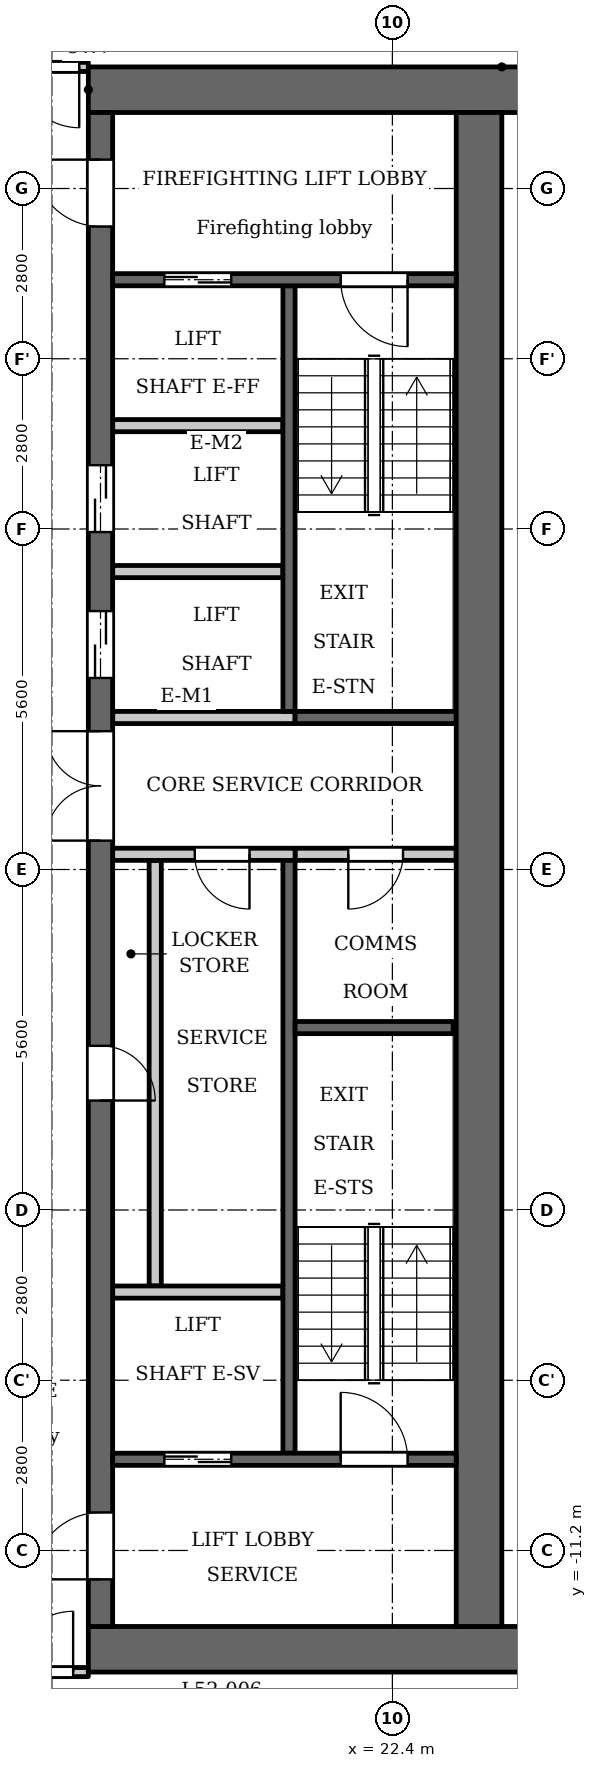
"""IFC4 building model, lengths in metres.
Left out: names, types, materials, properties, quantities, classifications, styles, units other than length and angle.
Written with IfcOpenShell. Run it as: python <this file> out.ifc"""

import sys

from ifc_helpers import new_model, si_unit, direction, frame, frame_2d, origin, place, context, subcontext, project, spatial, rectangle, extrude, element, fill, save


model = new_model("IFC4")
c1 = context("Model", 3, precision=1e-05, world=origin(), true_north=direction((0.0, 1.0)))
c2 = subcontext(c1, "Body", "Model", "MODEL_VIEW")
j1 = project(units=[si_unit("LENGTHUNIT", "METRE"), si_unit("PLANEANGLEUNIT", "RADIAN")], contexts=[c1])
p1 = place(None, origin())
s1 = spatial("IfcSite", under=j1, at=p1, CompositionType="ELEMENT")
p2 = place(p1, origin())
s2 = spatial("IfcBuilding", under=s1, at=p2, CompositionType="ELEMENT")
p3 = place(p2, frame((0.0, 0.0, 202.9)))
s3 = spatial("IfcBuildingStorey", under=s2, at=p3, CompositionType="ELEMENT", Elevation=202.9)
p4 = place(p3, frame((20.7, 2.6, 0.0), z_axis=(0.0, 0.0, 1.0), x_axis=(0.0, 1.0, 0.0)))
e1 = element("IfcWall", 1, at=p4, inside=s3, PredefinedType="SHEAR", context=c2, shape_type="SweptSolid", body=[
    extrude(rectangle(XDim=7.0, YDim=0.2, at=frame_2d((3.5, 0.0))), origin(), (0.0, 0.0, 1.0), 3.2),
])
p5 = place(p3, frame((20.7, -9.6, 0.0), z_axis=(0.0, 0.0, 1.0), x_axis=(0.0, 1.0, 0.0)))
e2 = element("IfcWall", 2, at=p5, inside=s3, PredefinedType="SHEAR", context=c2, shape_type="SweptSolid", body=[
    extrude(rectangle(XDim=9.75, YDim=0.2, at=frame_2d((4.875, 0.0))), origin(), (0.0, 0.0, 1.0), 3.2),
])
p6 = place(p3, frame((20.8, 2.5, 0.0), z_axis=(0.0, 0.0, 1.0), x_axis=(1.0, 0.0, 0.0)))
e3 = element("IfcWall", 3, at=p6, inside=s3, PredefinedType="SHEAR", context=c2, shape_type="SweptSolid", body=[
    extrude(rectangle(XDim=2.65, YDim=0.2, at=frame_2d((1.325, 0.0))), origin(), (0.0, 0.0, 1.0), 3.2),
])
p7 = place(p3, frame((20.8, 0.25, 0.0), z_axis=(0.0, 0.0, 1.0), x_axis=(1.0, 0.0, 0.0)))
e4 = element("IfcWall", 4, at=p7, inside=s3, PredefinedType="PARTITIONING", context=c2, shape_type="SweptSolid", body=[
    extrude(rectangle(XDim=2.65, YDim=0.2, at=frame_2d((1.325, 0.0))), origin(), (0.0, 0.0, 1.0), 3.2),
])
p8 = place(p7, frame((0.875, 0.0, 0.0)))
e5 = element("IfcOpeningElement", 5, at=p8, cuts=e4, PredefinedType="OPENING", context=c2, shape_type="SweptSolid", body=[
    extrude(rectangle(XDim=0.9, YDim=2.1, at=frame_2d((0.45, 1.05))), frame((0.0, 0.11, 0.0), z_axis=(0.0, -1.0, 0.0), x_axis=(1.0, 0.0, 0.0)), (0.0, 0.0, 1.0), 0.22),
])
for number, where, z_axis, x_axis in (
    (6, (17.4, 12.825, 0.0), (0.0, 0.0, 1.0), (1.0, 0.0, 0.0)),
    (7, (17.4, -12.825, 0.0), (0.0, 0.0, 1.0), (1.0, 0.0, 0.0)),
):
    element("IfcWall", number, at=place(p3, frame(where, z_axis=z_axis, x_axis=x_axis)), inside=s3, PredefinedType="SHEAR", context=c2, shape_type="SweptSolid", body=[
        extrude(rectangle(XDim=7.6, YDim=0.75, at=frame_2d((3.8, 0.0))), origin(), (0.0, 0.0, 1.0), 3.2),
    ])
p9 = place(p3, frame((18.5, -6.85, 0.0), z_axis=(0.0, 0.0, 1.0), x_axis=(0.0, 1.0, 0.0)))
e8 = element("IfcWall", 8, at=p9, inside=s3, PredefinedType="PARTITIONING", context=c2, shape_type="SweptSolid", body=[
    extrude(rectangle(XDim=7.0, YDim=0.2, at=frame_2d((3.5, 0.0))), origin(), (0.0, 0.0, 1.0), 3.2),
])
p10 = place(p3, frame((17.6, -12.45, 0.0), z_axis=(0.0, 0.0, 1.0), x_axis=(0.0, 1.0, 0.0)))
e9 = element("IfcWall", 9, at=p10, inside=s3, PredefinedType="SHEAR", context=c2, shape_type="SweptSolid", body=[
    extrude(rectangle(XDim=24.9, YDim=0.4, at=frame_2d((12.45, 0.0))), origin(), (0.0, 0.0, 1.0), 3.2),
])
p11 = place(p10, frame((8.65, 0.0, 0.0)))
e10 = element("IfcOpeningElement", 10, at=p11, cuts=e9, PredefinedType="OPENING", context=c2, shape_type="SweptSolid", body=[
    extrude(rectangle(XDim=0.9, YDim=2.1, at=frame_2d((0.45, 1.05))), frame((0.0, 0.21, 0.0), z_axis=(0.0, -1.0, 0.0), x_axis=(1.0, 0.0, 0.0)), (0.0, 0.0, 1.0), 0.42),
])
p12 = place(p10, frame((15.6, 0.0, 0.0)))
e11 = element("IfcOpeningElement", 11, at=p12, cuts=e9, PredefinedType="OPENING", context=c2, shape_type="SweptSolid", body=[
    extrude(rectangle(XDim=1.1, YDim=2.1, at=frame_2d((0.55, 1.05))), frame((0.0, 0.21, 0.0), z_axis=(0.0, -1.0, 0.0), x_axis=(1.0, 0.0, 0.0)), (0.0, 0.0, 1.0), 0.42),
])
p13 = place(p10, frame((18.0, 0.0, 0.0)))
e12 = element("IfcOpeningElement", 12, at=p13, cuts=e9, PredefinedType="OPENING", context=c2, shape_type="SweptSolid", body=[
    extrude(rectangle(XDim=1.1, YDim=2.1, at=frame_2d((0.55, 1.05))), frame((0.0, 0.21, 0.0), z_axis=(0.0, -1.0, 0.0), x_axis=(1.0, 0.0, 0.0)), (0.0, 0.0, 1.0), 0.42),
])
p14 = place(p10, frame((23.025, 0.0, 0.0)))
e13 = element("IfcOpeningElement", 13, at=p14, cuts=e9, PredefinedType="OPENING", context=c2, shape_type="SweptSolid", body=[
    extrude(rectangle(XDim=1.1, YDim=2.1, at=frame_2d((0.55, 1.05))), frame((0.0, 0.21, 0.0), z_axis=(0.0, -1.0, 0.0), x_axis=(1.0, 0.0, 0.0)), (0.0, 0.0, 1.0), 0.42),
])
p15 = place(p10, frame((0.775, 0.0, 0.0)))
e14 = element("IfcOpeningElement", 14, at=p15, cuts=e9, PredefinedType="OPENING", context=c2, shape_type="SweptSolid", body=[
    extrude(rectangle(XDim=1.1, YDim=2.1, at=frame_2d((0.55, 1.05))), frame((0.0, 0.21, 0.0), z_axis=(0.0, -1.0, 0.0), x_axis=(1.0, 0.0, 0.0)), (0.0, 0.0, 1.0), 0.42),
])
p16 = place(p10, frame((12.925, 0.0, 0.0)))
e15 = element("IfcOpeningElement", 15, at=p16, cuts=e9, PredefinedType="OPENING", context=c2, shape_type="SweptSolid", body=[
    extrude(rectangle(XDim=1.8, YDim=2.1, at=frame_2d((0.9, 1.05))), frame((0.0, 0.21, 0.0), z_axis=(0.0, -1.0, 0.0), x_axis=(1.0, 0.0, 0.0)), (0.0, 0.0, 1.0), 0.42),
])
p17 = place(p3, frame((23.825, -12.45, 0.0), z_axis=(0.0, 0.0, 1.0), x_axis=(0.0, 1.0, 0.0)))
e16 = element("IfcWall", 16, at=p17, inside=s3, PredefinedType="SHEAR", context=c2, shape_type="SweptSolid", body=[
    extrude(rectangle(XDim=24.9, YDim=0.75, at=frame_2d((12.45, 0.0))), origin(), (0.0, 0.0, 1.0), 3.2),
])
p18 = place(p3, frame((17.8, -9.7, 0.0), z_axis=(0.0, 0.0, 1.0), x_axis=(1.0, 0.0, 0.0)))
e17 = element("IfcWall", 17, at=p18, inside=s3, PredefinedType="SHEAR", context=c2, shape_type="SweptSolid", body=[
    extrude(rectangle(XDim=5.65, YDim=0.2, at=frame_2d((2.825, 0.0))), origin(), (0.0, 0.0, 1.0), 3.2),
])
p19 = place(p18, frame((0.85, 0.0, 0.0)))
e18 = element("IfcOpeningElement", 18, at=p19, cuts=e17, PredefinedType="OPENING", context=c2, shape_type="SweptSolid", body=[
    extrude(rectangle(XDim=1.1, YDim=2.1, at=frame_2d((0.55, 1.05))), frame((0.0, 0.11, 0.0), z_axis=(0.0, -1.0, 0.0), x_axis=(1.0, 0.0, 0.0)), (0.0, 0.0, 1.0), 0.22),
])
p20 = place(p18, frame((3.75, 0.0, 0.0)))
e19 = element("IfcOpeningElement", 19, at=p20, cuts=e17, PredefinedType="OPENING", context=c2, shape_type="SweptSolid", body=[
    extrude(rectangle(XDim=1.1, YDim=2.1, at=frame_2d((0.55, 1.05))), frame((0.0, 0.11, 0.0), z_axis=(0.0, -1.0, 0.0), x_axis=(1.0, 0.0, 0.0)), (0.0, 0.0, 1.0), 0.22),
])
p21 = place(p3, frame((17.8, -6.95, 0.0), z_axis=(0.0, 0.0, 1.0), x_axis=(1.0, 0.0, 0.0)))
e20 = element("IfcWall", 20, at=p21, inside=s3, PredefinedType="PARTITIONING", context=c2, shape_type="SweptSolid", body=[
    extrude(rectangle(XDim=2.8, YDim=0.2, at=frame_2d((1.4, 0.0))), origin(), (0.0, 0.0, 1.0), 3.2),
])
p22 = place(p3, frame((17.8, 0.25, 0.0), z_axis=(0.0, 0.0, 1.0), x_axis=(1.0, 0.0, 0.0)))
e21 = element("IfcWall", 21, at=p22, inside=s3, PredefinedType="PARTITIONING", context=c2, shape_type="SweptSolid", body=[
    extrude(rectangle(XDim=3.0, YDim=0.2, at=frame_2d((1.5, 0.0))), origin(), (0.0, 0.0, 1.0), 3.2),
])
p23 = place(p22, frame((1.35, 0.0, 0.0)))
e22 = element("IfcOpeningElement", 22, at=p23, cuts=e21, PredefinedType="OPENING", context=c2, shape_type="SweptSolid", body=[
    extrude(rectangle(XDim=0.9, YDim=2.1, at=frame_2d((0.45, 1.05))), frame((0.0, 0.11, 0.0), z_axis=(0.0, -1.0, 0.0), x_axis=(1.0, 0.0, 0.0)), (0.0, 0.0, 1.0), 0.22),
])
p24 = place(p3, frame((17.8, 2.5, 0.0), z_axis=(0.0, 0.0, 1.0), x_axis=(1.0, 0.0, 0.0)))
e23 = element("IfcWall", 23, at=p24, inside=s3, PredefinedType="PARTITIONING", context=c2, shape_type="SweptSolid", body=[
    extrude(rectangle(XDim=3.0, YDim=0.2, at=frame_2d((1.5, 0.0))), origin(), (0.0, 0.0, 1.0), 3.2),
])
for number, where, z_axis, x_axis in (
    (24, (17.8, 4.9, 0.0), (0.0, 0.0, 1.0), (1.0, 0.0, 0.0)),
    (25, (17.8, 7.3, 0.0), (0.0, 0.0, 1.0), (1.0, 0.0, 0.0)),
):
    element("IfcWall", number, at=place(p3, frame(where, z_axis=z_axis, x_axis=x_axis)), inside=s3, PredefinedType="PARTITIONING", context=c2, shape_type="SweptSolid", body=[
        extrude(rectangle(XDim=2.8, YDim=0.2, at=frame_2d((1.4, 0.0))), origin(), (0.0, 0.0, 1.0), 3.2),
    ])
p25 = place(p3, frame((17.8, 9.7, 0.0), z_axis=(0.0, 0.0, 1.0), x_axis=(1.0, 0.0, 0.0)))
e26 = element("IfcWall", 26, at=p25, inside=s3, PredefinedType="SHEAR", context=c2, shape_type="SweptSolid", body=[
    extrude(rectangle(XDim=5.65, YDim=0.2, at=frame_2d((2.825, 0.0))), origin(), (0.0, 0.0, 1.0), 3.2),
])
p26 = place(p25, frame((0.85, 0.0, 0.0)))
e27 = element("IfcOpeningElement", 27, at=p26, cuts=e26, PredefinedType="OPENING", context=c2, shape_type="SweptSolid", body=[
    extrude(rectangle(XDim=1.1, YDim=2.1, at=frame_2d((0.55, 1.05))), frame((0.0, 0.11, 0.0), z_axis=(0.0, -1.0, 0.0), x_axis=(1.0, 0.0, 0.0)), (0.0, 0.0, 1.0), 0.22),
])
p27 = place(p25, frame((3.75, 0.0, 0.0)))
e28 = element("IfcOpeningElement", 28, at=p27, cuts=e26, PredefinedType="OPENING", context=c2, shape_type="SweptSolid", body=[
    extrude(rectangle(XDim=1.1, YDim=2.1, at=frame_2d((0.55, 1.05))), frame((0.0, 0.11, 0.0), z_axis=(0.0, -1.0, 0.0), x_axis=(1.0, 0.0, 0.0)), (0.0, 0.0, 1.0), 0.22),
])
p28 = place(p3, frame((20.8, -2.6, 0.0), z_axis=(0.0, 0.0, 1.0), x_axis=(1.0, 0.0, 0.0)))
e29 = element("IfcWall", 29, at=p28, inside=s3, PredefinedType="SHEAR", context=c2, shape_type="SweptSolid", body=[
    extrude(rectangle(XDim=2.6, YDim=0.2, at=frame_2d((1.3, 0.0))), origin(), (0.0, 0.0, 1.0), 3.2),
])
p29 = place(p3, frame((-17.4, -13.2, 0.0), z_axis=(0.0, 0.0, 1.0), x_axis=(1.0, 0.0, 0.0)))
e30 = element("IfcWall", 30, at=p29, inside=s3, PredefinedType="PARTITIONING", context=c2, shape_type="SweptSolid", body=[
    extrude(rectangle(XDim=34.8, YDim=0.15, at=frame_2d((17.4, 0.0))), origin(), (0.0, 0.0, 1.0), 3.2),
])
p30 = place(p29, frame((0.15, 0.0, 0.0)))
e31 = element("IfcOpeningElement", 31, at=p30, cuts=e30, PredefinedType="OPENING", context=c2, shape_type="SweptSolid", body=[
    extrude(rectangle(XDim=1.0, YDim=2.1, at=frame_2d((0.5, 1.05))), frame((0.0, 0.085, 0.0), z_axis=(0.0, -1.0, 0.0), x_axis=(1.0, 0.0, 0.0)), (0.0, 0.0, 1.0), 0.17),
])
p31 = place(p29, frame((33.55, 0.0, 0.0)))
e32 = element("IfcOpeningElement", 32, at=p31, cuts=e30, PredefinedType="OPENING", context=c2, shape_type="SweptSolid", body=[
    extrude(rectangle(XDim=1.0, YDim=2.1, at=frame_2d((0.5, 1.05))), frame((0.0, 0.085, 0.0), z_axis=(0.0, -1.0, 0.0), x_axis=(1.0, 0.0, 0.0)), (0.0, 0.0, 1.0), 0.17),
])
p32 = place(p3, frame((-17.4, 13.2, 0.0), z_axis=(0.0, 0.0, 1.0), x_axis=(1.0, 0.0, 0.0)))
e33 = element("IfcWall", 33, at=p32, inside=s3, PredefinedType="PARTITIONING", context=c2, shape_type="SweptSolid", body=[
    extrude(rectangle(XDim=34.8, YDim=0.15, at=frame_2d((17.4, 0.0))), origin(), (0.0, 0.0, 1.0), 3.2),
])
p33 = place(p32, frame((0.25, 0.0, 0.0)))
e34 = element("IfcOpeningElement", 34, at=p33, cuts=e33, PredefinedType="OPENING", context=c2, shape_type="SweptSolid", body=[
    extrude(rectangle(XDim=1.0, YDim=2.1, at=frame_2d((0.5, 1.05))), frame((0.0, 0.085, 0.0), z_axis=(0.0, -1.0, 0.0), x_axis=(1.0, 0.0, 0.0)), (0.0, 0.0, 1.0), 0.17),
])
p34 = place(p32, frame((33.65, 0.0, 0.0)))
e35 = element("IfcOpeningElement", 35, at=p34, cuts=e33, PredefinedType="OPENING", context=c2, shape_type="SweptSolid", body=[
    extrude(rectangle(XDim=1.0, YDim=2.1, at=frame_2d((0.5, 1.05))), frame((0.0, 0.085, 0.0), z_axis=(0.0, -1.0, 0.0), x_axis=(1.0, 0.0, 0.0)), (0.0, 0.0, 1.0), 0.17),
])
p35 = place(p19, origin())
e36 = element("IfcDoor", 36, at=p35, inside=s3, OperationType="DOUBLE_DOOR_SLIDING", PredefinedType="DOOR", context=c2, shape_type="SweptSolid", body=[
    extrude(rectangle(XDim=1.1, YDim=2.1, at=frame_2d((0.55, 1.05))), frame((0.0, 0.025, 0.0), z_axis=(0.0, -1.0, 0.0), x_axis=(1.0, 0.0, 0.0)), (0.0, 0.0, 1.0), 0.05),
])
fill(e18, e36)
p36 = place(p11, origin())
e37 = element("IfcDoor", 37, at=p36, inside=s3, OperationType="SINGLE_SWING_LEFT", PredefinedType="DOOR", context=c2, shape_type="SweptSolid", body=[
    extrude(rectangle(XDim=0.9, YDim=2.1, at=frame_2d((0.45, 1.05))), frame((0.0, 0.025, 0.0), z_axis=(0.0, -1.0, 0.0), x_axis=(1.0, 0.0, 0.0)), (0.0, 0.0, 1.0), 0.05),
])
fill(e10, e37)
p37 = place(p23, origin())
e38 = element("IfcDoor", 38, at=p37, inside=s3, OperationType="SINGLE_SWING_RIGHT", PredefinedType="DOOR", context=c2, shape_type="SweptSolid", body=[
    extrude(rectangle(XDim=0.9, YDim=2.1, at=frame_2d((0.45, 1.05))), frame((0.0, 0.025, 0.0), z_axis=(0.0, -1.0, 0.0), x_axis=(1.0, 0.0, 0.0)), (0.0, 0.0, 1.0), 0.05),
])
fill(e22, e38)
p38 = place(p12, origin())
e39 = element("IfcDoor", 39, at=p38, inside=s3, OperationType="DOUBLE_DOOR_SLIDING", PredefinedType="DOOR", context=c2, shape_type="SweptSolid", body=[
    extrude(rectangle(XDim=1.1, YDim=2.1, at=frame_2d((0.55, 1.05))), frame((0.0, 0.025, 0.0), z_axis=(0.0, -1.0, 0.0), x_axis=(1.0, 0.0, 0.0)), (0.0, 0.0, 1.0), 0.05),
])
fill(e11, e39)
p39 = place(p13, origin())
e40 = element("IfcDoor", 40, at=p39, inside=s3, OperationType="DOUBLE_DOOR_SLIDING", PredefinedType="DOOR", context=c2, shape_type="SweptSolid", body=[
    extrude(rectangle(XDim=1.1, YDim=2.1, at=frame_2d((0.55, 1.05))), frame((0.0, 0.025, 0.0), z_axis=(0.0, -1.0, 0.0), x_axis=(1.0, 0.0, 0.0)), (0.0, 0.0, 1.0), 0.05),
])
fill(e12, e40)
p40 = place(p26, origin())
e41 = element("IfcDoor", 41, at=p40, inside=s3, OperationType="DOUBLE_DOOR_SLIDING", PredefinedType="DOOR", context=c2, shape_type="SweptSolid", body=[
    extrude(rectangle(XDim=1.1, YDim=2.1, at=frame_2d((0.55, 1.05))), frame((0.0, 0.025, 0.0), z_axis=(0.0, -1.0, 0.0), x_axis=(1.0, 0.0, 0.0)), (0.0, 0.0, 1.0), 0.05),
])
fill(e27, e41)
p41 = place(p14, origin())
e42 = element("IfcDoor", 42, at=p41, inside=s3, OperationType="SINGLE_SWING_LEFT", PredefinedType="DOOR", context=c2, shape_type="SweptSolid", body=[
    extrude(rectangle(XDim=1.1, YDim=2.1, at=frame_2d((0.55, 1.05))), frame((0.0, 0.025, 0.0), z_axis=(0.0, -1.0, 0.0), x_axis=(1.0, 0.0, 0.0)), (0.0, 0.0, 1.0), 0.05),
])
fill(e13, e42)
p42 = place(p15, origin())
e43 = element("IfcDoor", 43, at=p42, inside=s3, OperationType="SINGLE_SWING_RIGHT", PredefinedType="DOOR", context=c2, shape_type="SweptSolid", body=[
    extrude(rectangle(XDim=1.1, YDim=2.1, at=frame_2d((0.55, 1.05))), frame((0.0, 0.025, 0.0), z_axis=(0.0, -1.0, 0.0), x_axis=(1.0, 0.0, 0.0)), (0.0, 0.0, 1.0), 0.05),
])
fill(e14, e43)
p43 = place(p27, origin())
e44 = element("IfcDoor", 44, at=p43, inside=s3, OperationType="SINGLE_SWING_RIGHT", PredefinedType="DOOR", context=c2, shape_type="SweptSolid", body=[
    extrude(rectangle(XDim=1.1, YDim=2.1, at=frame_2d((0.55, 1.05))), frame((0.0, 0.025, 0.0), z_axis=(0.0, -1.0, 0.0), x_axis=(1.0, 0.0, 0.0)), (0.0, 0.0, 1.0), 0.05),
])
fill(e28, e44)
p44 = place(p20, origin())
e45 = element("IfcDoor", 45, at=p44, inside=s3, OperationType="SINGLE_SWING_RIGHT", PredefinedType="DOOR", context=c2, shape_type="SweptSolid", body=[
    extrude(rectangle(XDim=1.1, YDim=2.1, at=frame_2d((0.55, 1.05))), frame((0.0, 0.025, 0.0), z_axis=(0.0, -1.0, 0.0), x_axis=(1.0, 0.0, 0.0)), (0.0, 0.0, 1.0), 0.05),
])
fill(e19, e45)
p45 = place(p16, origin())
e46 = element("IfcDoor", 46, at=p45, inside=s3, OperationType="DOUBLE_DOOR_SINGLE_SWING", PredefinedType="DOOR", context=c2, shape_type="SweptSolid", body=[
    extrude(rectangle(XDim=1.8, YDim=2.1, at=frame_2d((0.9, 1.05))), frame((0.0, 0.025, 0.0), z_axis=(0.0, -1.0, 0.0), x_axis=(1.0, 0.0, 0.0)), (0.0, 0.0, 1.0), 0.05),
])
fill(e15, e46)
p46 = place(p8, origin())
e47 = element("IfcDoor", 47, at=p46, inside=s3, OperationType="SINGLE_SWING_LEFT", PredefinedType="DOOR", context=c2, shape_type="SweptSolid", body=[
    extrude(rectangle(XDim=0.9, YDim=2.1, at=frame_2d((0.45, 1.05))), frame((0.0, 0.025, 0.0), z_axis=(0.0, -1.0, 0.0), x_axis=(1.0, 0.0, 0.0)), (0.0, 0.0, 1.0), 0.05),
])
fill(e5, e47)
p47 = place(p34, origin())
e48 = element("IfcDoor", 48, at=p47, inside=s3, OperationType="SINGLE_SWING_RIGHT", PredefinedType="DOOR", context=c2, shape_type="SweptSolid", body=[
    extrude(rectangle(XDim=1.0, YDim=2.1, at=frame_2d((0.5, 1.05))), frame((0.0, 0.025, 0.0), z_axis=(0.0, -1.0, 0.0), x_axis=(1.0, 0.0, 0.0)), (0.0, 0.0, 1.0), 0.05),
])
fill(e35, e48)
p48 = place(p31, origin())
e49 = element("IfcDoor", 49, at=p48, inside=s3, OperationType="SINGLE_SWING_LEFT", PredefinedType="DOOR", context=c2, shape_type="SweptSolid", body=[
    extrude(rectangle(XDim=1.0, YDim=2.1, at=frame_2d((0.5, 1.05))), frame((0.0, 0.025, 0.0), z_axis=(0.0, -1.0, 0.0), x_axis=(1.0, 0.0, 0.0)), (0.0, 0.0, 1.0), 0.05),
])
fill(e32, e49)
save(model, sys.argv[1])
